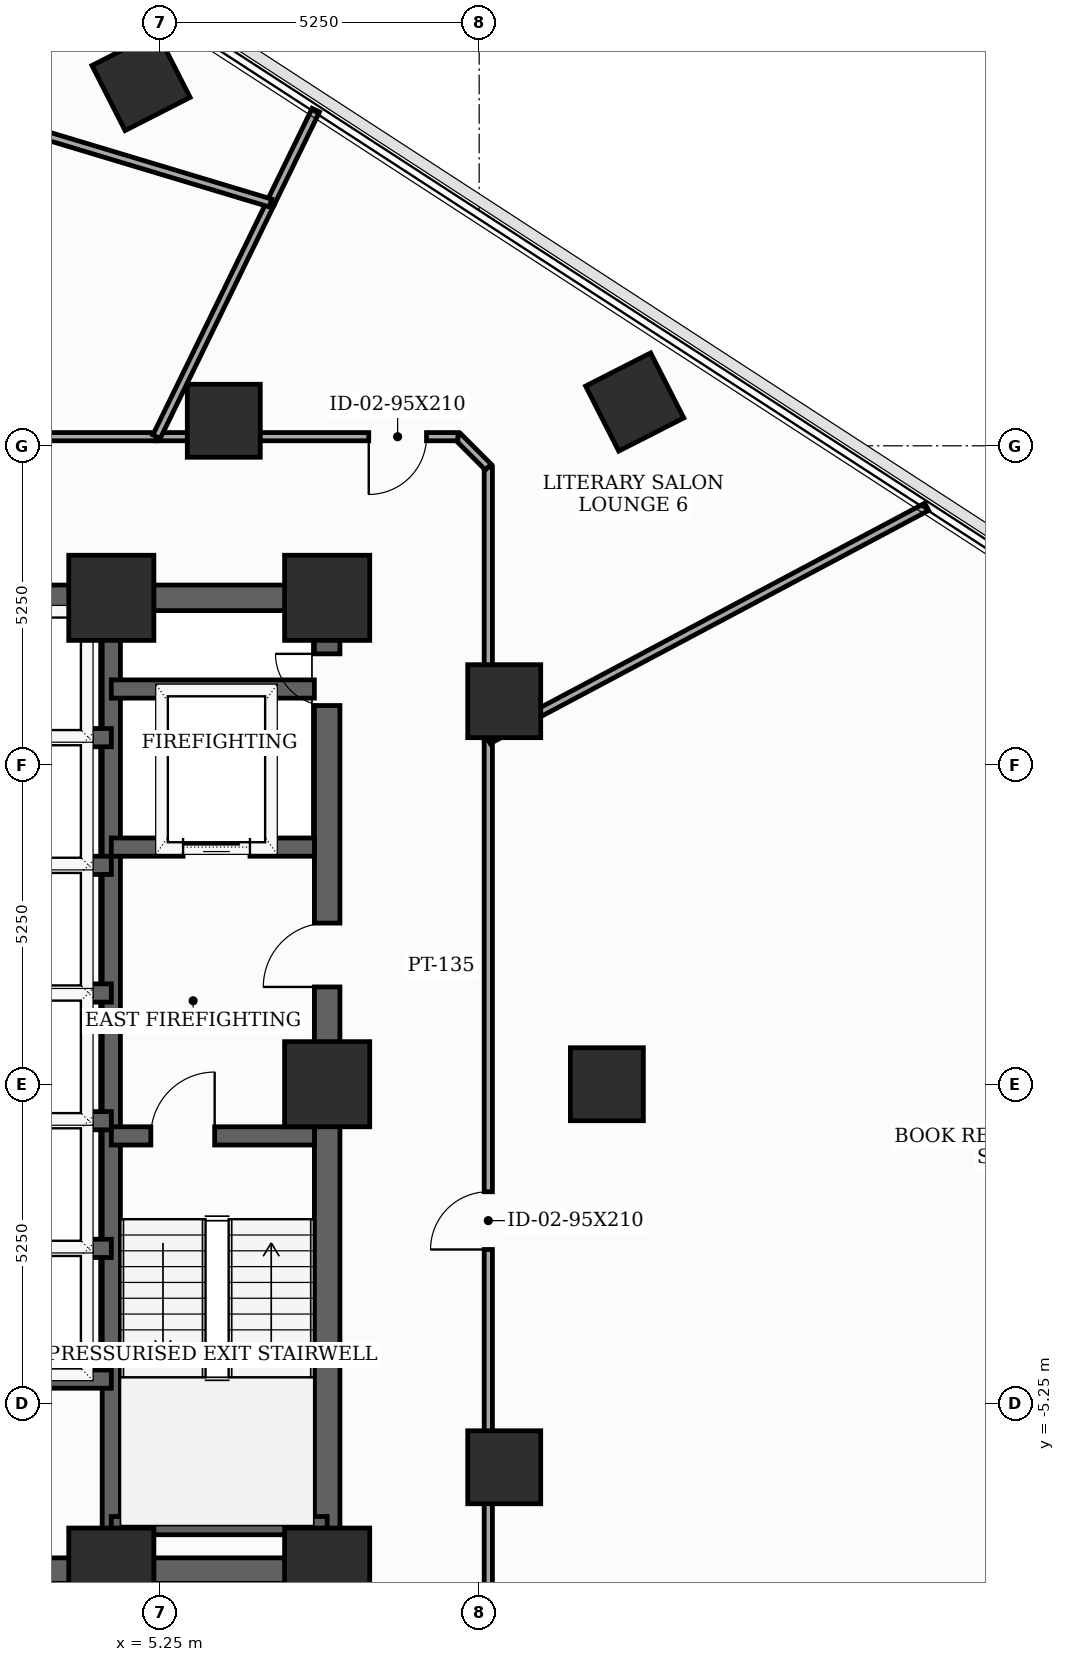
"""IFC4 building model, lengths in metres.
Left out: names, types, materials, properties, quantities, classifications, styles, units other than length and angle.
Written with IfcOpenShell. Run it as: python <this file> out.ifc"""

import sys

from ifc_helpers import new_model, si_unit, direction, frame, frame_2d, origin, origin_2d, place, context, subcontext, project, spatial, rectangle, extrude, element, fill, save


model = new_model("IFC4")
c1 = context("Model", 3, precision=1e-05, world=origin(), true_north=direction((0.0, 1.0)))
c2 = subcontext(c1, "Body", "Model", "MODEL_VIEW")
j1 = project(units=[si_unit("LENGTHUNIT", "METRE"), si_unit("PLANEANGLEUNIT", "RADIAN")], contexts=[c1])
p1 = place(None, origin())
s1 = spatial("IfcSite", under=j1, at=p1, CompositionType="ELEMENT")
p2 = place(p1, origin())
s2 = spatial("IfcBuilding", under=s1, at=p2, CompositionType="ELEMENT")
p3 = place(p2, frame((0.0, 0.0, 138.4)))
s3 = spatial("IfcBuildingStorey", under=s2, at=p3, CompositionType="ELEMENT", Elevation=138.4)
for number, where, z_axis, x_axis in (
    (1, (4.45, -8.0, 0.0), (0.0, 0.0, 1.0), (1.0, 0.0, 0.0)),
    (2, (8.0, -8.0, 0.0), (0.0, 0.0, 1.0), (1.0, 0.0, 0.0)),
    (3, (8.0, 0.0, 0.0), (0.0, 0.0, 1.0), (1.0, 0.0, 0.0)),
    (4, (8.0, 8.0, 0.0), (0.0, 0.0, 1.0), (1.0, 0.0, 0.0)),
    (5, (4.45, 8.0, 0.0), (0.0, 0.0, 1.0), (1.0, 0.0, 0.0)),
):
    element("IfcColumn", number, at=place(p3, frame(where, z_axis=z_axis, x_axis=x_axis)), inside=s3, PredefinedType="COLUMN", context=c2, shape_type="SweptSolid", body=[
        extrude(rectangle(XDim=1.4, YDim=1.4, at=origin_2d()), origin(), (0.0, 0.0, 1.0), 3.7),
    ])
for number, where, z_axis, x_axis in (
    (6, (12.6, 0.0, 0.0), (0.0, 0.0, 1.0), (1.0, 0.0, 0.0)),
    (7, (10.912, 6.3, 0.0), (0.0, 0.0, 1.0), (1.0, 0.0, 0.0)),
    (8, (6.3, 10.912, 0.0), (0.0, 0.0, 1.0), (1.0, 0.0, 0.0)),
    (9, (10.912, -6.3, 0.0), (0.0, 0.0, 1.0), (1.0, 0.0, 0.0)),
    (10, (13.058, 11.22, 0.0), (0.0, 0.0, 1.0), (0.891, 0.454, 0.0)),
    (11, (4.939, 16.492, 0.0), (0.0, 0.0, 1.0), (0.891, 0.454, 0.0)),
):
    element("IfcColumn", number, at=place(p3, frame(where, z_axis=z_axis, x_axis=x_axis)), inside=s3, PredefinedType="COLUMN", context=c2, shape_type="SweptSolid", body=[
        extrude(rectangle(XDim=1.2, YDim=1.2, at=origin_2d()), origin(), (0.0, 0.0, 1.0), 3.7),
    ])
p4 = place(p3, frame((8.0, -8.0, 0.0), z_axis=(0.0, 0.0, 1.0), x_axis=(0.0, 1.0, 0.0)))
e12 = element("IfcWall", 12, at=p4, inside=s3, PredefinedType="SHEAR", context=c2, shape_type="SweptSolid", body=[
    extrude(rectangle(XDim=16.0, YDim=0.42, at=frame_2d((8.0, 0.0))), origin(), (0.0, 0.0, 1.0), 3.5),
])
p5 = place(p4, frame((9.6, 0.0, 0.0)))
e13 = element("IfcOpeningElement", 13, at=p5, cuts=e12, PredefinedType="OPENING", context=c2, shape_type="SweptSolid", body=[
    extrude(rectangle(XDim=1.05, YDim=2.15, at=frame_2d((0.525, 1.075))), frame((0.0, 0.22, 0.0), z_axis=(0.0, -1.0, 0.0), x_axis=(1.0, 0.0, 0.0)), (0.0, 0.0, 1.0), 0.44),
])
p6 = place(p4, frame((14.229, 0.0, 0.0)))
e14 = element("IfcOpeningElement", 14, at=p6, cuts=e12, PredefinedType="OPENING", context=c2, shape_type="SweptSolid", body=[
    extrude(rectangle(XDim=0.85, YDim=2.02, at=frame_2d((0.425, 1.01))), frame((0.0, 0.22, 0.0), z_axis=(0.0, -1.0, 0.0), x_axis=(1.0, 0.0, 0.0)), (0.0, 0.0, 1.0), 0.44),
])
p7 = place(p3, frame((-8.0, -8.0, 0.0), z_axis=(0.0, 0.0, 1.0), x_axis=(1.0, 0.0, 0.0)))
e15 = element("IfcWall", 15, at=p7, inside=s3, PredefinedType="SHEAR", context=c2, shape_type="SweptSolid", body=[
    extrude(rectangle(XDim=16.0, YDim=0.42, at=frame_2d((8.0, 0.0))), origin(), (0.0, 0.0, 1.0), 3.5),
])
p8 = place(p7, frame((4.6, 0.0, 0.0)))
e16 = element("IfcOpeningElement", 16, at=p8, cuts=e15, PredefinedType="OPENING", context=c2, shape_type="SweptSolid", body=[
    extrude(rectangle(XDim=0.95, YDim=2.1, at=frame_2d((0.475, 1.05))), frame((0.0, 0.22, 0.0), z_axis=(0.0, -1.0, 0.0), x_axis=(1.0, 0.0, 0.0)), (0.0, 0.0, 1.0), 0.44),
])
p9 = place(p7, frame((7.52, 0.0, 0.0)))
e17 = element("IfcOpeningElement", 17, at=p9, cuts=e15, PredefinedType="OPENING", context=c2, shape_type="SweptSolid", body=[
    extrude(rectangle(XDim=0.95, YDim=2.1, at=frame_2d((0.475, 1.05))), frame((0.0, 0.22, 0.0), z_axis=(0.0, -1.0, 0.0), x_axis=(1.0, 0.0, 0.0)), (0.0, 0.0, 1.0), 0.44),
])
p10 = place(p7, frame((10.45, 0.0, 0.0)))
e18 = element("IfcOpeningElement", 18, at=p10, cuts=e15, PredefinedType="OPENING", context=c2, shape_type="SweptSolid", body=[
    extrude(rectangle(XDim=0.95, YDim=2.1, at=frame_2d((0.475, 1.05))), frame((0.0, 0.22, 0.0), z_axis=(0.0, -1.0, 0.0), x_axis=(1.0, 0.0, 0.0)), (0.0, 0.0, 1.0), 0.44),
])
p11 = place(p3, frame((-8.0, 8.0, 0.0), z_axis=(0.0, 0.0, 1.0), x_axis=(1.0, 0.0, 0.0)))
e19 = element("IfcWall", 19, at=p11, inside=s3, PredefinedType="SHEAR", context=c2, shape_type="SweptSolid", body=[
    extrude(rectangle(XDim=16.0, YDim=0.42, at=frame_2d((8.0, 0.0))), origin(), (0.0, 0.0, 1.0), 3.5),
])
p12 = place(p11, frame((7.1, 0.0, 0.0)))
e20 = element("IfcOpeningElement", 20, at=p12, cuts=e19, PredefinedType="OPENING", context=c2, shape_type="SweptSolid", body=[
    extrude(rectangle(XDim=1.8, YDim=2.15, at=frame_2d((0.9, 1.075))), frame((0.0, 0.22, 0.0), z_axis=(0.0, -1.0, 0.0), x_axis=(1.0, 0.0, 0.0)), (0.0, 0.0, 1.0), 0.44),
])
p13 = place(p3, frame((4.45, -7.79, 0.0), z_axis=(0.0, 0.0, 1.0), x_axis=(0.0, 1.0, 0.0)))
e21 = element("IfcWall", 21, at=p13, inside=s3, PredefinedType="SHEAR", context=c2, shape_type="SweptSolid", body=[
    extrude(rectangle(XDim=15.58, YDim=0.3, at=frame_2d((7.79, 0.0))), origin(), (0.0, 0.0, 1.0), 3.5),
])
p14 = place(p3, frame((4.45, -0.85, 0.0), z_axis=(0.0, 0.0, 1.0), x_axis=(1.0, 0.0, 0.0)))
e22 = element("IfcWall", 22, at=p14, inside=s3, PredefinedType="SHEAR", context=c2, shape_type="SweptSolid", body=[
    extrude(rectangle(XDim=3.34, YDim=0.3, at=frame_2d((1.67, 0.0))), origin(), (0.0, 0.0, 1.0), 3.5),
])
p15 = place(p14, frame((0.65, 0.0, 0.0)))
e23 = element("IfcOpeningElement", 23, at=p15, cuts=e22, PredefinedType="OPENING", context=c2, shape_type="SweptSolid", body=[
    extrude(rectangle(XDim=1.05, YDim=2.15, at=frame_2d((0.525, 1.075))), frame((0.0, 0.16, 0.0), z_axis=(0.0, -1.0, 0.0), x_axis=(1.0, 0.0, 0.0)), (0.0, 0.0, 1.0), 0.32),
])
p16 = place(p3, frame((4.45, -7.26, 0.0), z_axis=(0.0, 0.0, 1.0), x_axis=(1.0, 0.0, 0.0)))
e24 = element("IfcWall", 24, at=p16, inside=s3, PredefinedType="SHEAR", context=c2, shape_type="SweptSolid", body=[
    extrude(rectangle(XDim=3.55, YDim=0.3, at=frame_2d((1.775, 0.0))), origin(), (0.0, 0.0, 1.0), 3.5),
])
p17 = place(p3, frame((4.45, 3.9, 0.0), z_axis=(0.0, 0.0, 1.0), x_axis=(1.0, 0.0, 0.0)))
e25 = element("IfcWall", 25, at=p17, inside=s3, PredefinedType="SHEAR", context=c2, shape_type="SweptSolid", body=[
    extrude(rectangle(XDim=3.34, YDim=0.3, at=frame_2d((1.67, 0.0))), origin(), (0.0, 0.0, 1.0), 3.5),
])
p18 = place(p17, frame((1.18, 0.0, 0.0)))
e26 = element("IfcOpeningElement", 26, at=p18, cuts=e25, PredefinedType="OPENING", context=c2, shape_type="SweptSolid", body=[
    extrude(rectangle(XDim=1.1, YDim=2.1, at=frame_2d((0.55, 1.05))), frame((0.0, 0.16, 0.0), z_axis=(0.0, -1.0, 0.0), x_axis=(1.0, 0.0, 0.0)), (0.0, 0.0, 1.0), 0.32),
])
p19 = place(p3, frame((4.45, 6.5, 0.0), z_axis=(0.0, 0.0, 1.0), x_axis=(1.0, 0.0, 0.0)))
e27 = element("IfcWall", 27, at=p19, inside=s3, PredefinedType="SHEAR", context=c2, shape_type="SweptSolid", body=[
    extrude(rectangle(XDim=3.34, YDim=0.3, at=frame_2d((1.67, 0.0))), origin(), (0.0, 0.0, 1.0), 3.5),
])
p20 = place(p3, frame((-4.45, -4.85, 0.0), z_axis=(0.0, 0.0, 1.0), x_axis=(1.0, 0.0, 0.0)))
e28 = element("IfcWall", 28, at=p20, inside=s3, PredefinedType="SHEAR", context=c2, shape_type="SweptSolid", body=[
    extrude(rectangle(XDim=8.9, YDim=0.3, at=frame_2d((4.45, 0.0))), origin(), (0.0, 0.0, 1.0), 3.5),
])
for number, where, z_axis, x_axis in (
    (29, (1.68, 1.5, 0.0), (0.0, 0.0, 1.0), (1.0, 0.0, 0.0)),
    (30, (1.68, 3.6, 0.0), (0.0, 0.0, 1.0), (1.0, 0.0, 0.0)),
    (31, (1.68, 5.7, 0.0), (0.0, 0.0, 1.0), (1.0, 0.0, 0.0)),
    (32, (1.68, -2.7, 0.0), (0.0, 0.0, 1.0), (1.0, 0.0, 0.0)),
    (33, (1.68, -0.6, 0.0), (0.0, 0.0, 1.0), (1.0, 0.0, 0.0)),
):
    element("IfcWall", number, at=place(p3, frame(where, z_axis=z_axis, x_axis=x_axis)), inside=s3, PredefinedType="SHEAR", context=c2, shape_type="SweptSolid", body=[
        extrude(rectangle(XDim=2.77, YDim=0.3, at=frame_2d((1.385, 0.0))), origin(), (0.0, 0.0, 1.0), 3.5),
    ])
p21 = place(p3, frame((10.65, -10.15, 0.0), z_axis=(0.0, 0.0, 1.0), x_axis=(0.0, 1.0, 0.0)))
e34 = element("IfcWall", 34, at=p21, inside=s3, PredefinedType="PARTITIONING", context=c2, shape_type="SweptSolid", body=[
    extrude(rectangle(XDim=15.813, YDim=0.135, at=frame_2d((7.906, 0.0))), origin(), (0.0, 0.0, 1.0), 2.785),
])
p22 = place(p21, frame((7.431, 0.0, 0.0)))
e35 = element("IfcOpeningElement", 35, at=p22, cuts=e34, PredefinedType="OPENING", context=c2, shape_type="SweptSolid", body=[
    extrude(rectangle(XDim=0.95, YDim=2.1, at=frame_2d((0.475, 1.05))), frame((0.0, 0.077, 0.0), z_axis=(0.0, -1.0, 0.0), x_axis=(1.0, 0.0, 0.0)), (0.0, 0.0, 1.0), 0.155),
])
p23 = place(p3, frame((10.65, 5.663, 0.0), z_axis=(0.0, 0.0, 1.0), x_axis=(0.0, 1.0, 0.0)))
e36 = element("IfcWall", 36, at=p23, inside=s3, PredefinedType="PARTITIONING", context=c2, shape_type="SweptSolid", body=[
    extrude(rectangle(XDim=4.487, YDim=0.135, at=frame_2d((2.243, 0.0))), origin(), (0.0, 0.0, 1.0), 2.785),
])
p24 = place(p3, frame((10.65, 10.15, 0.0), z_axis=(0.0, 0.0, 1.0), x_axis=(-0.707106781187, 0.707106781187, 0.0)))
e37 = element("IfcWall", 37, at=p24, inside=s3, PredefinedType="PARTITIONING", context=c2, shape_type="SweptSolid", body=[
    extrude(rectangle(XDim=0.707, YDim=0.135, at=frame_2d((0.354, 0.0))), origin(), (0.0, 0.0, 1.0), 3.125),
])
p25 = place(p3, frame((10.15, 10.65, 0.0), z_axis=(0.0, 0.0, 1.0), x_axis=(-1.0, 0.0, 0.0)))
e38 = element("IfcWall", 38, at=p25, inside=s3, PredefinedType="PARTITIONING", context=c2, shape_type="SweptSolid", body=[
    extrude(rectangle(XDim=4.956, YDim=0.135, at=frame_2d((2.478, 0.0))), origin(), (0.0, 0.0, 1.0), 2.785),
])
p26 = place(p25, frame((0.516, 0.0, 0.0)))
e39 = element("IfcOpeningElement", 39, at=p26, cuts=e38, PredefinedType="OPENING", context=c2, shape_type="SweptSolid", body=[
    extrude(rectangle(XDim=0.95, YDim=2.1, at=frame_2d((0.475, 1.05))), frame((0.0, 0.077, 0.0), z_axis=(0.0, -1.0, 0.0), x_axis=(1.0, 0.0, 0.0)), (0.0, 0.0, 1.0), 0.155),
])
p27 = place(p3, frame((5.194, 10.65, 0.0), z_axis=(0.0, 0.0, 1.0), x_axis=(-1.0, 0.0, 0.0)))
e40 = element("IfcWall", 40, at=p27, inside=s3, PredefinedType="PARTITIONING", context=c2, shape_type="SweptSolid", body=[
    extrude(rectangle(XDim=7.849, YDim=0.135, at=frame_2d((3.925, 0.0))), origin(), (0.0, 0.0, 1.0), 2.785),
])
p28 = place(p27, frame((3.449, 0.0, 0.0)))
e41 = element("IfcOpeningElement", 41, at=p28, cuts=e40, PredefinedType="OPENING", context=c2, shape_type="SweptSolid", body=[
    extrude(rectangle(XDim=0.95, YDim=2.1, at=frame_2d((0.475, 1.05))), frame((0.0, 0.077, 0.0), z_axis=(0.0, -1.0, 0.0), x_axis=(1.0, 0.0, 0.0)), (0.0, 0.0, 1.0), 0.155),
])
p29 = place(p3, frame((17.86, 9.497, 0.0), z_axis=(0.0, 0.0, 1.0), x_axis=(-0.882966259968, -0.469436453376, 0.0)))
e42 = element("IfcWall", 42, at=p29, inside=s3, PredefinedType="PARTITIONING", context=c2, shape_type="SweptSolid", body=[
    extrude(rectangle(XDim=8.166, YDim=0.135, at=frame_2d((4.083, 0.0))), origin(), (0.0, 0.0, 1.0), 2.785),
])
p30 = place(p3, frame((7.069, 14.493, 0.0), z_axis=(0.0, 0.0, 1.0), x_axis=(-0.438491124388, -0.898735519401, 0.0)))
e43 = element("IfcWall", 43, at=p30, inside=s3, PredefinedType="PARTITIONING", context=c2, shape_type="SweptSolid", body=[
    extrude(rectangle(XDim=4.276, YDim=0.135, at=frame_2d((2.138, 0.0))), origin(), (0.0, 0.0, 1.0), 2.785),
])
p31 = place(p3, frame((7.813, 16.021, 0.0), z_axis=(0.0, 0.0, 1.0), x_axis=(-0.437939658317, -0.899004369107, 0.0)))
e44 = element("IfcWall", 44, at=p31, inside=s3, PredefinedType="PARTITIONING", context=c2, shape_type="SweptSolid", body=[
    extrude(rectangle(XDim=1.7, YDim=0.135, at=frame_2d((0.85, 0.0))), origin(), (0.0, 0.0, 1.0), 2.985),
])
p32 = place(p3, frame((7.069, 14.493, 0.0), z_axis=(0.0, 0.0, 1.0), x_axis=(-0.957562573124, 0.288225464789, 0.0)))
e45 = element("IfcWall", 45, at=p32, inside=s3, PredefinedType="PARTITIONING", context=c2, shape_type="SweptSolid", body=[
    extrude(rectangle(XDim=5.614, YDim=0.135, at=frame_2d((2.807, 0.0))), origin(), (0.0, 0.0, 1.0), 2.885),
])
p33 = place(p5, origin())
e46 = element("IfcDoor", 46, at=p33, inside=s3, OperationType="SINGLE_SWING_LEFT", PredefinedType="DOOR", context=c2, shape_type="SweptSolid", body=[
    extrude(rectangle(XDim=1.05, YDim=2.15, at=frame_2d((0.525, 1.075))), frame((0.0, 0.025, 0.0), z_axis=(0.0, -1.0, 0.0), x_axis=(1.0, 0.0, 0.0)), (0.0, 0.0, 1.0), 0.05),
])
fill(e13, e46)
p34 = place(p6, origin())
e47 = element("IfcDoor", 47, at=p34, inside=s3, OperationType="SINGLE_SWING_RIGHT", PredefinedType="TRAPDOOR", context=c2, shape_type="SweptSolid", body=[
    extrude(rectangle(XDim=0.85, YDim=2.02, at=frame_2d((0.425, 1.01))), frame((0.0, 0.025, 0.0), z_axis=(0.0, -1.0, 0.0), x_axis=(1.0, 0.0, 0.0)), (0.0, 0.0, 1.0), 0.05),
])
fill(e14, e47)
p35 = place(p15, origin())
e48 = element("IfcDoor", 48, at=p35, inside=s3, OperationType="SINGLE_SWING_RIGHT", PredefinedType="DOOR", context=c2, shape_type="SweptSolid", body=[
    extrude(rectangle(XDim=1.05, YDim=2.15, at=frame_2d((0.525, 1.075))), frame((0.0, 0.025, 0.0), z_axis=(0.0, -1.0, 0.0), x_axis=(1.0, 0.0, 0.0)), (0.0, 0.0, 1.0), 0.05),
])
fill(e23, e48)
p36 = place(p18, origin())
e49 = element("IfcDoor", 49, at=p36, inside=s3, OperationType="SLIDING_TO_LEFT", PredefinedType="DOOR", context=c2, shape_type="SweptSolid", body=[
    extrude(rectangle(XDim=1.1, YDim=2.1, at=frame_2d((0.55, 1.05))), frame((0.0, 0.025, 0.0), z_axis=(0.0, -1.0, 0.0), x_axis=(1.0, 0.0, 0.0)), (0.0, 0.0, 1.0), 0.05),
])
fill(e26, e49)
p37 = place(p22, origin())
e50 = element("IfcDoor", 50, at=p37, inside=s3, OperationType="SINGLE_SWING_LEFT", PredefinedType="DOOR", context=c2, shape_type="SweptSolid", body=[
    extrude(rectangle(XDim=0.95, YDim=2.1, at=frame_2d((0.475, 1.05))), frame((0.0, 0.025, 0.0), z_axis=(0.0, -1.0, 0.0), x_axis=(1.0, 0.0, 0.0)), (0.0, 0.0, 1.0), 0.05),
])
fill(e35, e50)
p38 = place(p26, origin())
e51 = element("IfcDoor", 51, at=p38, inside=s3, OperationType="SINGLE_SWING_RIGHT", PredefinedType="DOOR", context=c2, shape_type="SweptSolid", body=[
    extrude(rectangle(XDim=0.95, YDim=2.1, at=frame_2d((0.475, 1.05))), frame((0.0, 0.025, 0.0), z_axis=(0.0, -1.0, 0.0), x_axis=(1.0, 0.0, 0.0)), (0.0, 0.0, 1.0), 0.05),
])
fill(e39, e51)
save(model, sys.argv[1])
